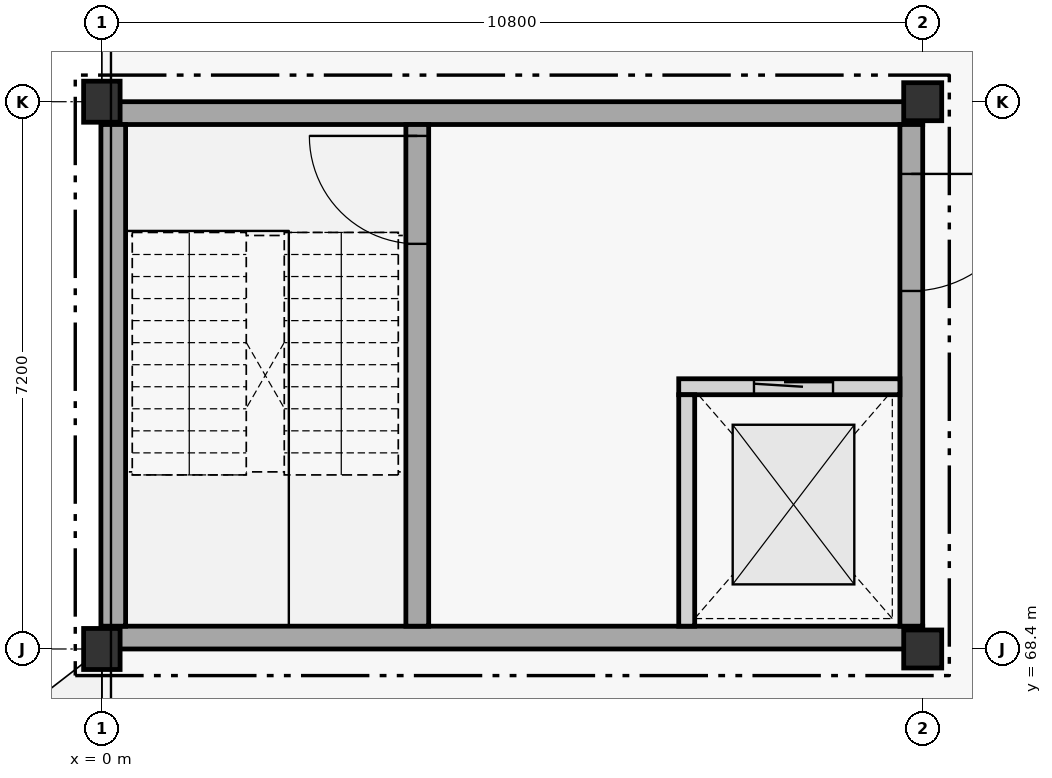
"""IFC4 building model, lengths in metres.
Left out: names, types, materials, properties, quantities, classifications, styles, units other than length and angle.
Written with IfcOpenShell. Run it as: python <this file> out.ifc"""

import sys

from ifc_helpers import new_model, si_unit, direction, frame, frame_2d, origin, origin_2d, place, context, subcontext, project, spatial, rectangle, extrude, element, fill, save


model = new_model("IFC4")
c1 = context("Model", 3, precision=1e-05, world=origin(), true_north=direction((0.0, 1.0)))
c2 = subcontext(c1, "Body", "Model", "MODEL_VIEW")
j1 = project(units=[si_unit("LENGTHUNIT", "METRE"), si_unit("PLANEANGLEUNIT", "RADIAN")], contexts=[c1])
p1 = place(None, origin())
s1 = spatial("IfcSite", under=j1, at=p1, CompositionType="ELEMENT")
p2 = place(p1, origin())
s2 = spatial("IfcBuilding", under=s1, at=p2, CompositionType="ELEMENT")
p3 = place(p2, frame((0.0, 0.0, 19.2)))
s3 = spatial("IfcBuildingStorey", under=s2, at=p3, CompositionType="ELEMENT", Elevation=19.2)
for number, where, z_axis, x_axis in (
    (1, (0.0, 68.4, 0.0), (0.0, 0.0, 1.0), (1.0, 0.0, 0.0)),
    (2, (0.0, 75.6, 0.0), (0.0, 0.0, 1.0), (1.0, 0.0, 0.0)),
):
    element("IfcColumn", number, at=place(p3, frame(where, z_axis=z_axis, x_axis=x_axis)), inside=s3, PredefinedType="COLUMN", context=c2, shape_type="SweptSolid", body=[
        extrude(rectangle(XDim=0.48, YDim=0.54, at=origin_2d()), origin(), (0.0, 0.0, 1.0), 4.2),
    ])
for number, where, z_axis, x_axis in (
    (3, (10.8, 68.4, 0.0), (0.0, 0.0, 1.0), (1.0, 0.0, 0.0)),
    (4, (10.8, 75.6, 0.0), (0.0, 0.0, 1.0), (1.0, 0.0, 0.0)),
):
    element("IfcColumn", number, at=place(p3, frame(where, z_axis=z_axis, x_axis=x_axis)), inside=s3, PredefinedType="COLUMN", context=c2, shape_type="SweptSolid", body=[
        extrude(rectangle(XDim=0.5, YDim=0.5, at=origin_2d()), origin(), (0.0, 0.0, 1.0), 4.2),
    ])
for number, where, z_axis, x_axis in (
    (5, (10.8, 68.55, 0.0), (0.0, 0.0, 1.0), (-1.0, 0.0, 0.0)),
    (6, (0.0, 75.45, 0.0), (0.0, 0.0, 1.0), (1.0, 0.0, 0.0)),
):
    element("IfcWall", number, at=place(p3, frame(where, z_axis=z_axis, x_axis=x_axis)), inside=s3, PredefinedType="SHEAR", context=c2, shape_type="SweptSolid", body=[
        extrude(rectangle(XDim=10.8, YDim=0.3, at=frame_2d((5.4, 0.0))), origin(), (0.0, 0.0, 1.0), 4.2),
    ])
p4 = place(p3, frame((0.15, 68.7, 0.0), z_axis=(0.0, 0.0, 1.0), x_axis=(0.0, 1.0, 0.0)))
e7 = element("IfcWall", 7, at=p4, inside=s3, PredefinedType="SHEAR", context=c2, shape_type="SweptSolid", body=[
    extrude(rectangle(XDim=6.6, YDim=0.325, at=frame_2d((3.3, 0.0))), origin(), (0.0, 0.0, 1.0), 4.2),
])
p5 = place(p3, frame((10.65, 75.3, 0.0), z_axis=(0.0, 0.0, 1.0), x_axis=(0.0, -1.0, 0.0)))
e8 = element("IfcWall", 8, at=p5, inside=s3, PredefinedType="SHEAR", context=c2, shape_type="SweptSolid", body=[
    extrude(rectangle(XDim=6.6, YDim=0.3, at=frame_2d((3.3, 0.0))), origin(), (0.0, 0.0, 1.0), 4.2),
])
p6 = place(p5, frame((0.65, 0.0, 0.0)))
e9 = element("IfcOpeningElement", 9, at=p6, cuts=e8, PredefinedType="OPENING", context=c2, shape_type="SweptSolid", body=[
    extrude(rectangle(XDim=1.54, YDim=2.22, at=frame_2d((0.77, 1.11))), frame((0.0, 0.15, 0.0), z_axis=(0.0, -1.0, 0.0), x_axis=(1.0, 0.0, 0.0)), (0.0, 0.0, 1.0), 0.3),
])
p7 = place(p3, frame((4.15, 68.7, 0.0), z_axis=(0.0, 0.0, 1.0), x_axis=(0.0, 1.0, 0.0)))
e10 = element("IfcWall", 10, at=p7, inside=s3, PredefinedType="SHEAR", context=c2, shape_type="SweptSolid", body=[
    extrude(rectangle(XDim=6.6, YDim=0.3, at=frame_2d((3.3, 0.0))), origin(), (0.0, 0.0, 1.0), 4.2),
])
p8 = place(p7, frame((5.03, 0.0, 0.0)))
e11 = element("IfcOpeningElement", 11, at=p8, cuts=e10, PredefinedType="OPENING", context=c2, shape_type="SweptSolid", body=[
    extrude(rectangle(XDim=1.42, YDim=2.2, at=frame_2d((0.71, 1.1))), frame((0.0, 0.15, 0.0), z_axis=(0.0, -1.0, 0.0), x_axis=(1.0, 0.0, 0.0)), (0.0, 0.0, 1.0), 0.3),
])
p9 = place(p3, frame((7.59, 71.85, 0.0), z_axis=(0.0, 0.0, 1.0), x_axis=(1.0, 0.0, 0.0)))
e12 = element("IfcWall", 12, at=p9, inside=s3, PredefinedType="STANDARD", context=c2, shape_type="SweptSolid", body=[
    extrude(rectangle(XDim=2.91, YDim=0.21, at=frame_2d((1.455, 0.0))), origin(), (0.0, 0.0, 1.0), 4.2),
])
p10 = place(p9, frame((0.99, 0.0, 0.0)))
e13 = element("IfcOpeningElement", 13, at=p10, cuts=e12, PredefinedType="OPENING", context=c2, shape_type="SweptSolid", body=[
    extrude(rectangle(XDim=1.04, YDim=2.16, at=frame_2d((0.52, 1.08))), frame((0.0, 0.105, 0.0), z_axis=(0.0, -1.0, 0.0), x_axis=(1.0, 0.0, 0.0)), (0.0, 0.0, 1.0), 0.21),
])
p11 = place(p3, frame((7.695, 68.7, 0.0), z_axis=(0.0, 0.0, 1.0), x_axis=(0.0, 1.0, 0.0)))
e14 = element("IfcWall", 14, at=p11, inside=s3, PredefinedType="STANDARD", context=c2, shape_type="SweptSolid", body=[
    extrude(rectangle(XDim=3.045, YDim=0.21, at=frame_2d((1.522, 0.0))), origin(), (0.0, 0.0, 1.0), 4.2),
])
p12 = place(p10, origin())
e15 = element("IfcDoor", 15, at=p12, inside=s3, OperationType="SLIDING_TO_LEFT", PredefinedType="DOOR", context=c2, shape_type="SweptSolid", body=[
    extrude(rectangle(XDim=1.04, YDim=2.16, at=frame_2d((0.52, 1.08))), frame((0.0, 0.025, 0.0), z_axis=(0.0, -1.0, 0.0), x_axis=(1.0, 0.0, 0.0)), (0.0, 0.0, 1.0), 0.05),
])
fill(e13, e15)
p13 = place(p8, origin())
e16 = element("IfcDoor", 16, at=p13, inside=s3, OperationType="SINGLE_SWING_RIGHT", PredefinedType="DOOR", context=c2, shape_type="SweptSolid", body=[
    extrude(rectangle(XDim=1.42, YDim=2.2, at=frame_2d((0.71, 1.1))), frame((0.0, 0.025, 0.0), z_axis=(0.0, -1.0, 0.0), x_axis=(1.0, 0.0, 0.0)), (0.0, 0.0, 1.0), 0.05),
])
fill(e11, e16)
p14 = place(p6, origin())
e17 = element("IfcDoor", 17, at=p14, inside=s3, OperationType="SINGLE_SWING_LEFT", PredefinedType="DOOR", context=c2, shape_type="SweptSolid", body=[
    extrude(rectangle(XDim=1.54, YDim=2.22, at=frame_2d((0.77, 1.11))), frame((0.0, 0.025, 0.0), z_axis=(0.0, -1.0, 0.0), x_axis=(1.0, 0.0, 0.0)), (0.0, 0.0, 1.0), 0.05),
])
fill(e9, e17)
save(model, sys.argv[1])
